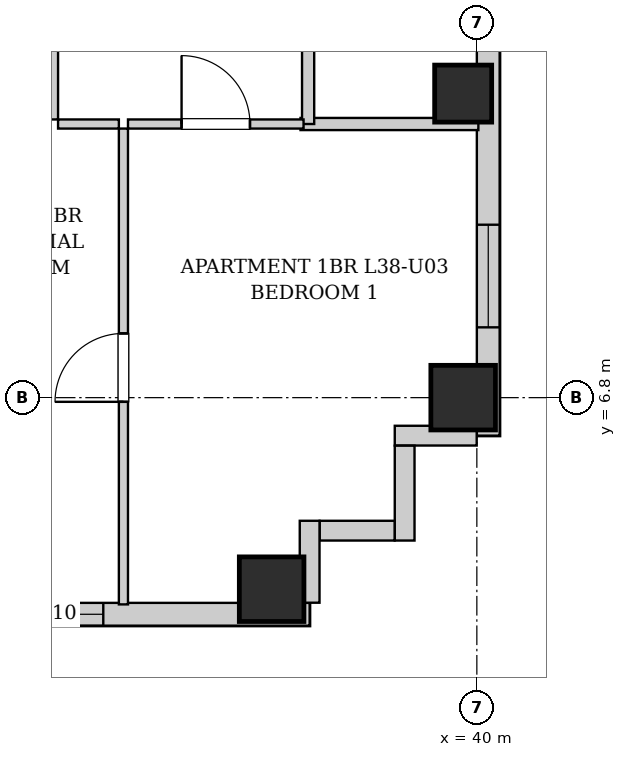
"""IFC4 building model, lengths in metres.
Left out: names, types, materials, properties, quantities, classifications, styles, units other than length and angle.
Written with IfcOpenShell. Run it as: python <this file> out.ifc"""

import sys

from ifc_helpers import new_model, si_unit, direction, frame, frame_2d, origin, origin_2d, place, context, subcontext, project, spatial, rectangle, extrude, element, fill, save


model = new_model("IFC4")
c1 = context("Model", 3, precision=1e-05, world=origin(), true_north=direction((0.0, 1.0)))
c2 = subcontext(c1, "Body", "Model", "MODEL_VIEW")
j1 = project(units=[si_unit("LENGTHUNIT", "METRE"), si_unit("PLANEANGLEUNIT", "RADIAN")], contexts=[c1])
p1 = place(None, origin())
s1 = spatial("IfcSite", under=j1, at=p1, CompositionType="ELEMENT")
p2 = place(p1, origin())
s2 = spatial("IfcBuilding", under=s1, at=p2, CompositionType="ELEMENT")
p3 = place(p2, frame((0.0, 0.0, 134.15)))
s3 = spatial("IfcBuildingStorey", under=s2, at=p3, CompositionType="ELEMENT", Elevation=134.15)
for number, where, z_axis, x_axis in (
    (1, (37.3, 4.28, 0.0), (0.0, 0.0, 1.0), (1.0, 0.0, 0.0)),
    (2, (39.82, 6.8, 0.0), (0.0, 0.0, 1.0), (1.0, 0.0, 0.0)),
):
    element("IfcColumn", number, at=place(p3, frame(where, z_axis=z_axis, x_axis=x_axis)), inside=s3, PredefinedType="COLUMN", context=c2, shape_type="SweptSolid", body=[
        extrude(rectangle(XDim=0.85, YDim=0.85, at=origin_2d()), origin(), (0.0, 0.0, 1.0), 3.25),
    ])
p4 = place(p3, frame((39.82, 10.8, 0.0), z_axis=(0.0, 0.0, 1.0), x_axis=(1.0, 0.0, 0.0)))
e3 = element("IfcColumn", 3, at=p4, inside=s3, PredefinedType="COLUMN", context=c2, shape_type="SweptSolid", body=[
    extrude(rectangle(XDim=0.75, YDim=0.75, at=origin_2d()), origin(), (0.0, 0.0, 1.0), 3.25),
])
p5 = place(p3, frame((40.15, 40.8, 0.0), z_axis=(0.0, 0.0, 1.0), x_axis=(0.0, -1.0, 0.0)))
e4 = element("IfcWall", 4, at=p5, inside=s3, PredefinedType="SOLIDWALL", context=c2, shape_type="SweptSolid", body=[
    extrude(rectangle(XDim=34.5, YDim=0.3, at=frame_2d((17.25, 0.0))), origin(), (0.0, 0.0, 1.0), 2.99),
])
p6 = place(p5, frame((31.725, 0.0, 0.55)))
e5 = element("IfcOpeningElement", 5, at=p6, cuts=e4, PredefinedType="OPENING", context=c2, shape_type="SweptSolid", body=[
    extrude(rectangle(XDim=1.35, YDim=1.2, at=frame_2d((0.675, 0.6))), frame((0.0, 0.16, 0.0), z_axis=(0.0, -1.0, 0.0), x_axis=(1.0, 0.0, 0.0)), (0.0, 0.0, 1.0), 0.32),
])
p7 = place(p5, frame((3.0, 0.0, 0.55)))
e6 = element("IfcOpeningElement", 6, at=p7, cuts=e4, PredefinedType="OPENING", context=c2, shape_type="SweptSolid", body=[
    extrude(rectangle(XDim=1.35, YDim=1.2, at=frame_2d((0.675, 0.6))), frame((0.0, 0.16, 0.0), z_axis=(0.0, -1.0, 0.0), x_axis=(1.0, 0.0, 0.0)), (0.0, 0.0, 1.0), 0.32),
])
p8 = place(p5, frame((1.085, 0.0, 0.55)))
e7 = element("IfcOpeningElement", 7, at=p8, cuts=e4, PredefinedType="OPENING", context=c2, shape_type="SweptSolid", body=[
    extrude(rectangle(XDim=1.35, YDim=1.2, at=frame_2d((0.675, 0.6))), frame((0.0, 0.16, 0.0), z_axis=(0.0, -1.0, 0.0), x_axis=(1.0, 0.0, 0.0)), (0.0, 0.0, 1.0), 0.32),
])
p9 = place(p5, frame((21.3, 0.0, 0.55)))
e8 = element("IfcOpeningElement", 8, at=p9, cuts=e4, PredefinedType="OPENING", context=c2, shape_type="SweptSolid", body=[
    extrude(rectangle(XDim=1.35, YDim=1.2, at=frame_2d((0.675, 0.6))), frame((0.0, 0.16, 0.0), z_axis=(0.0, -1.0, 0.0), x_axis=(1.0, 0.0, 0.0)), (0.0, 0.0, 1.0), 0.32),
])
p10 = place(p5, frame((22.91, 0.0, 0.55)))
e9 = element("IfcOpeningElement", 9, at=p10, cuts=e4, PredefinedType="OPENING", context=c2, shape_type="SweptSolid", body=[
    extrude(rectangle(XDim=1.35, YDim=1.2, at=frame_2d((0.675, 0.6))), frame((0.0, 0.16, 0.0), z_axis=(0.0, -1.0, 0.0), x_axis=(1.0, 0.0, 0.0)), (0.0, 0.0, 1.0), 0.32),
])
p11 = place(p5, frame((14.175, 0.0, 0.55)))
e10 = element("IfcOpeningElement", 10, at=p11, cuts=e4, PredefinedType="OPENING", context=c2, shape_type="SweptSolid", body=[
    extrude(rectangle(XDim=1.35, YDim=1.2, at=frame_2d((0.675, 0.6))), frame((0.0, 0.16, 0.0), z_axis=(0.0, -1.0, 0.0), x_axis=(1.0, 0.0, 0.0)), (0.0, 0.0, 1.0), 0.32),
])
p12 = place(p5, frame((12.335, 0.0, 0.55)))
e11 = element("IfcOpeningElement", 11, at=p12, cuts=e4, PredefinedType="OPENING", context=c2, shape_type="SweptSolid", body=[
    extrude(rectangle(XDim=1.35, YDim=1.2, at=frame_2d((0.675, 0.6))), frame((0.0, 0.16, 0.0), z_axis=(0.0, -1.0, 0.0), x_axis=(1.0, 0.0, 0.0)), (0.0, 0.0, 1.0), 0.32),
])
p13 = place(p3, frame((37.8, 3.95, 0.0), z_axis=(0.0, 0.0, 1.0), x_axis=(-1.0, 0.0, 0.0)))
e12 = element("IfcWall", 12, at=p13, inside=s3, PredefinedType="SOLIDWALL", context=c2, shape_type="SweptSolid", body=[
    extrude(rectangle(XDim=20.7, YDim=0.3, at=frame_2d((10.35, 0.0))), origin(), (0.0, 0.0, 1.0), 2.99),
])
p14 = place(p13, frame((17.305, 0.0, 0.55)))
e13 = element("IfcOpeningElement", 13, at=p14, cuts=e12, PredefinedType="OPENING", context=c2, shape_type="SweptSolid", body=[
    extrude(rectangle(XDim=1.35, YDim=1.2, at=frame_2d((0.675, 0.6))), frame((0.0, 0.16, 0.0), z_axis=(0.0, -1.0, 0.0), x_axis=(1.0, 0.0, 0.0)), (0.0, 0.0, 1.0), 0.32),
])
p15 = place(p13, frame((7.106, 0.0, 0.55)))
e14 = element("IfcOpeningElement", 14, at=p15, cuts=e12, PredefinedType="OPENING", context=c2, shape_type="SweptSolid", body=[
    extrude(rectangle(XDim=1.35, YDim=1.2, at=frame_2d((0.675, 0.6))), frame((0.0, 0.16, 0.0), z_axis=(0.0, -1.0, 0.0), x_axis=(1.0, 0.0, 0.0)), (0.0, 0.0, 1.0), 0.32),
])
p16 = place(p13, frame((2.715, 0.0, 0.55)))
e15 = element("IfcOpeningElement", 15, at=p16, cuts=e12, PredefinedType="OPENING", context=c2, shape_type="SweptSolid", body=[
    extrude(rectangle(XDim=1.35, YDim=1.2, at=frame_2d((0.675, 0.6))), frame((0.0, 0.16, 0.0), z_axis=(0.0, -1.0, 0.0), x_axis=(1.0, 0.0, 0.0)), (0.0, 0.0, 1.0), 0.32),
])
p17 = place(p3, frame((39.998, 6.3, 0.0), z_axis=(0.0, 0.0, 1.0), x_axis=(-1.0, 0.0, 0.0)))
e16 = element("IfcWall", 16, at=p17, inside=s3, PredefinedType="SOLIDWALL", context=c2, shape_type="SweptSolid", body=[
    extrude(rectangle(XDim=1.078, YDim=0.26, at=frame_2d((0.539, 0.0))), origin(), (0.0, 0.0, 1.0), 2.99),
])
p18 = place(p3, frame((39.05, 6.168, 0.0), z_axis=(0.0, 0.0, 1.0), x_axis=(0.0, -1.0, 0.0)))
e17 = element("IfcWall", 17, at=p18, inside=s3, PredefinedType="SOLIDWALL", context=c2, shape_type="SweptSolid", body=[
    extrude(rectangle(XDim=1.248, YDim=0.26, at=frame_2d((0.624, 0.0))), origin(), (0.0, 0.0, 1.0), 2.99),
])
p19 = place(p3, frame((38.918, 5.05, 0.0), z_axis=(0.0, 0.0, 1.0), x_axis=(-1.0, 0.0, 0.0)))
e18 = element("IfcWall", 18, at=p19, inside=s3, PredefinedType="SOLIDWALL", context=c2, shape_type="SweptSolid", body=[
    extrude(rectangle(XDim=0.986, YDim=0.26, at=frame_2d((0.493, 0.0))), origin(), (0.0, 0.0, 1.0), 2.99),
])
p20 = place(p3, frame((37.8, 5.18, 0.0), z_axis=(0.0, 0.0, 1.0), x_axis=(0.0, -1.0, 0.0)))
e19 = element("IfcWall", 19, at=p20, inside=s3, PredefinedType="SOLIDWALL", context=c2, shape_type="SweptSolid", body=[
    extrude(rectangle(XDim=1.078, YDim=0.26, at=frame_2d((0.539, 0.0))), origin(), (0.0, 0.0, 1.0), 2.99),
])
p21 = place(p3, frame((37.68, 10.4, 0.0), z_axis=(0.0, 0.0, 1.0), x_axis=(1.0, 0.0, 0.0)))
e20 = element("IfcWall", 20, at=p21, inside=s3, PredefinedType="PARTITIONING", context=c2, shape_type="SweptSolid", body=[
    extrude(rectangle(XDim=2.34, YDim=0.16, at=frame_2d((1.17, 0.0))), origin(), (0.0, 0.0, 1.0), 2.99),
])
p22 = place(p3, frame((37.78, 10.4, 0.0), z_axis=(0.0, 0.0, 1.0), x_axis=(0.0, 1.0, 0.0)))
e21 = element("IfcWall", 21, at=p22, inside=s3, PredefinedType="PARTITIONING", context=c2, shape_type="SweptSolid", body=[
    extrude(rectangle(XDim=2.91, YDim=0.16, at=frame_2d((1.455, 0.0))), origin(), (0.0, 0.0, 1.0), 2.99),
])
p23 = place(p3, frame((34.43, 10.46, 0.0), z_axis=(0.0, 0.0, 1.0), x_axis=(0.0, 1.0, 0.0)))
e22 = element("IfcWall", 22, at=p23, inside=s3, PredefinedType="PARTITIONING", context=c2, shape_type="SweptSolid", body=[
    extrude(rectangle(XDim=2.85, YDim=0.12, at=frame_2d((1.425, 0.0))), origin(), (0.0, 0.0, 1.0), 2.99),
])
p24 = place(p23, frame((0.975, 0.0, 0.0)))
e23 = element("IfcOpeningElement", 23, at=p24, cuts=e22, PredefinedType="OPENING", context=c2, shape_type="SweptSolid", body=[
    extrude(rectangle(XDim=0.9, YDim=2.05, at=frame_2d((0.45, 1.025))), frame((0.0, 0.07, 0.0), z_axis=(0.0, -1.0, 0.0), x_axis=(1.0, 0.0, 0.0)), (0.0, 0.0, 1.0), 0.14),
])
p25 = place(p3, frame((34.49, 10.4, 0.0), z_axis=(0.0, 0.0, 1.0), x_axis=(1.0, 0.0, 0.0)))
e24 = element("IfcWall", 24, at=p25, inside=s3, PredefinedType="PARTITIONING", context=c2, shape_type="SweptSolid", body=[
    extrude(rectangle(XDim=0.8, YDim=0.12, at=frame_2d((0.4, 0.0))), origin(), (0.0, 0.0, 1.0), 2.99),
])
p26 = place(p3, frame((35.41, 10.4, 0.0), z_axis=(0.0, 0.0, 1.0), x_axis=(1.0, 0.0, 0.0)))
e25 = element("IfcWall", 25, at=p26, inside=s3, PredefinedType="PARTITIONING", context=c2, shape_type="SweptSolid", body=[
    extrude(rectangle(XDim=2.31, YDim=0.12, at=frame_2d((1.155, 0.0))), origin(), (0.0, 0.0, 1.0), 2.99),
])
p27 = place(p26, frame((0.705, 0.0, 0.0)))
e26 = element("IfcOpeningElement", 26, at=p27, cuts=e25, PredefinedType="OPENING", context=c2, shape_type="SweptSolid", body=[
    extrude(rectangle(XDim=0.9, YDim=2.05, at=frame_2d((0.45, 1.025))), frame((0.0, 0.07, 0.0), z_axis=(0.0, -1.0, 0.0), x_axis=(1.0, 0.0, 0.0)), (0.0, 0.0, 1.0), 0.14),
])
p28 = place(p3, frame((35.35, 4.08, 0.0), z_axis=(0.0, 0.0, 1.0), x_axis=(0.0, 1.0, 0.0)))
e27 = element("IfcWall", 27, at=p28, inside=s3, PredefinedType="PARTITIONING", context=c2, shape_type="SweptSolid", body=[
    extrude(rectangle(XDim=6.26, YDim=0.12, at=frame_2d((3.13, 0.0))), origin(), (0.0, 0.0, 1.0), 2.99),
])
p29 = place(p28, frame((2.665, 0.0, 0.0)))
e28 = element("IfcOpeningElement", 28, at=p29, cuts=e27, PredefinedType="OPENING", context=c2, shape_type="SweptSolid", body=[
    extrude(rectangle(XDim=0.9, YDim=2.05, at=frame_2d((0.45, 1.025))), frame((0.0, 0.07, 0.0), z_axis=(0.0, -1.0, 0.0), x_axis=(1.0, 0.0, 0.0)), (0.0, 0.0, 1.0), 0.14),
])
p30 = place(p27, origin())
e29 = element("IfcDoor", 29, at=p30, inside=s3, OperationType="SINGLE_SWING_LEFT", PredefinedType="DOOR", context=c2, shape_type="SweptSolid", body=[
    extrude(rectangle(XDim=0.9, YDim=2.05, at=frame_2d((0.45, 1.025))), frame((0.0, 0.025, 0.0), z_axis=(0.0, -1.0, 0.0), x_axis=(1.0, 0.0, 0.0)), (0.0, 0.0, 1.0), 0.05),
])
fill(e26, e29)
p31 = place(p29, origin())
e30 = element("IfcDoor", 30, at=p31, inside=s3, OperationType="SINGLE_SWING_LEFT", PredefinedType="DOOR", context=c2, shape_type="SweptSolid", body=[
    extrude(rectangle(XDim=0.9, YDim=2.05, at=frame_2d((0.45, 1.025))), frame((0.0, 0.025, 0.0), z_axis=(0.0, -1.0, 0.0), x_axis=(1.0, 0.0, 0.0)), (0.0, 0.0, 1.0), 0.05),
])
fill(e28, e30)
p32 = place(p16, origin())
e31 = element("IfcWindow", 31, at=p32, inside=s3, PartitioningType="SINGLE_PANEL", PredefinedType="WINDOW", context=c2, shape_type="SweptSolid", body=[
    extrude(rectangle(XDim=1.35, YDim=1.2, at=frame_2d((0.675, 0.6))), frame((0.0, 0.03, 0.0), z_axis=(0.0, -1.0, 0.0), x_axis=(1.0, 0.0, 0.0)), (0.0, 0.0, 1.0), 0.06),
])
fill(e15, e31)
p33 = place(p6, origin())
e32 = element("IfcWindow", 32, at=p33, inside=s3, PartitioningType="SINGLE_PANEL", PredefinedType="WINDOW", context=c2, shape_type="SweptSolid", body=[
    extrude(rectangle(XDim=1.35, YDim=1.2, at=frame_2d((0.675, 0.6))), frame((0.0, 0.03, 0.0), z_axis=(0.0, -1.0, 0.0), x_axis=(1.0, 0.0, 0.0)), (0.0, 0.0, 1.0), 0.06),
])
fill(e5, e32)
save(model, sys.argv[1])
